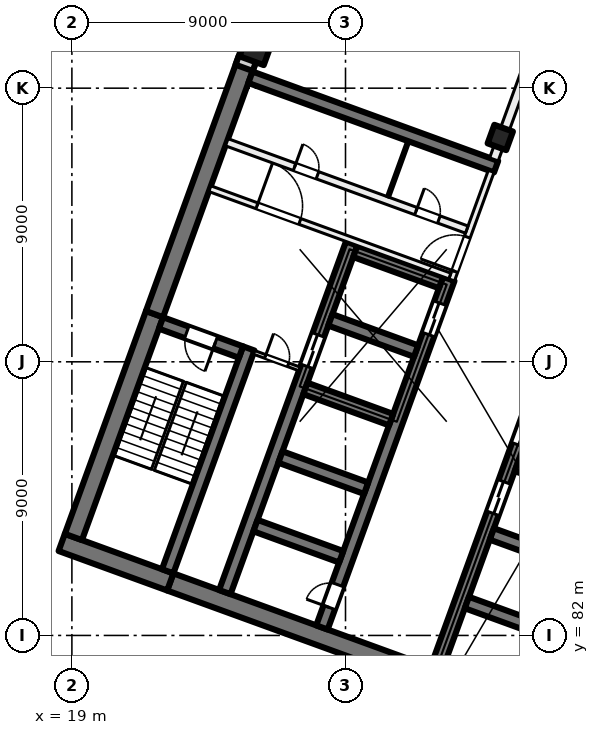
"""IFC4 building model, lengths in metres.
Left out: names, types, materials, properties, quantities, classifications, styles, units other than length and angle.
Written with IfcOpenShell. Run it as: python <this file> out.ifc"""

import sys

from ifc_helpers import new_model, si_unit, direction, frame, frame_2d, origin, origin_2d, place, context, subcontext, project, spatial, rectangle, extrude, element, fill, save


model = new_model("IFC4")
c1 = context("Model", 3, precision=1e-05, world=origin(), true_north=direction((0.0, 1.0)))
c2 = subcontext(c1, "Body", "Model", "MODEL_VIEW")
j1 = project(units=[si_unit("LENGTHUNIT", "METRE"), si_unit("PLANEANGLEUNIT", "RADIAN")], contexts=[c1])
p1 = place(None, origin())
s1 = spatial("IfcSite", under=j1, at=p1, CompositionType="ELEMENT")
p2 = place(p1, origin())
s2 = spatial("IfcBuilding", under=s1, at=p2, CompositionType="ELEMENT")
p3 = place(p2, frame((0.0, 0.0, 89.0)))
s3 = spatial("IfcBuildingStorey", under=s2, at=p3, CompositionType="ELEMENT", Elevation=89.0)
p4 = place(p3, frame((33.091, 98.379, 0.0), z_axis=(0.0, 0.0, 1.0), x_axis=(-0.342020143326, -0.939692620786, 0.0)))
e1 = element("IfcColumn", 1, at=p4, inside=s3, PredefinedType="COLUMN", context=c2, shape_type="SweptSolid", body=[
    extrude(rectangle(XDim=0.65, YDim=0.65, at=origin_2d()), origin(), (0.0, 0.0, 1.0), 4.0),
])
p5 = place(p3, frame((25.056, 101.303, 0.0), z_axis=(0.0, 0.0, 1.0), x_axis=(-0.342020143326, -0.939692620786, 0.0)))
e2 = element("IfcColumn", 2, at=p5, inside=s3, PredefinedType="COLUMN", context=c2, shape_type="SweptSolid", body=[
    extrude(rectangle(XDim=0.85, YDim=0.85, at=origin_2d()), origin(), (0.0, 0.0, 1.0), 4.0),
])
p6 = place(p3, frame((35.767, 78.835, 0.0), z_axis=(0.0, 0.0, 1.0), x_axis=(-0.939692894512, 0.342019391267, 0.0)))
e3 = element("IfcWall", 3, at=p6, inside=s3, PredefinedType="SHEAR", context=c2, shape_type="SweptSolid", body=[
    extrude(rectangle(XDim=14.4, YDim=0.6, at=frame_2d((7.2, 0.0))), origin(), (0.0, 0.0, 1.0), 4.0),
])
p7 = place(p3, frame((22.236, 83.76, 0.0), z_axis=(0.0, 0.0, 1.0), x_axis=(-0.939680822529, 0.342052557032, 0.0)))
e4 = element("IfcWall", 4, at=p7, inside=s3, PredefinedType="SHEAR", context=c2, shape_type="SweptSolid", body=[
    extrude(rectangle(XDim=3.8, YDim=0.6, at=frame_2d((1.9, 0.0))), origin(), (0.0, 0.0, 1.0), 4.0),
])
p8 = place(p3, frame((19.05, 85.239, 0.0), z_axis=(0.0, 0.0, 1.0), x_axis=(0.342016982193, 0.939693771338, 0.0)))
e5 = element("IfcWall", 5, at=p8, inside=s3, PredefinedType="SHEAR", context=c2, shape_type="SweptSolid", body=[
    extrude(rectangle(XDim=7.8, YDim=0.6, at=frame_2d((3.9, 0.0))), origin(), (0.0, 0.0, 1.0), 4.0),
])
p9 = place(p3, frame((21.717, 92.568, 0.0), z_axis=(0.0, 0.0, 1.0), x_axis=(0.342017595281, 0.939693548195, 0.0)))
e6 = element("IfcWall", 6, at=p9, inside=s3, PredefinedType="SHEAR", context=c2, shape_type="SweptSolid", body=[
    extrude(rectangle(XDim=8.925, YDim=0.6, at=frame_2d((4.462, 0.0))), origin(), (0.0, 0.0, 1.0), 4.0),
])
p10 = place(p3, frame((22.15, 84.11, 0.0), z_axis=(0.0, 0.0, 1.0), x_axis=(0.342016982193, 0.939693771338, 0.0)))
e7 = element("IfcWall", 7, at=p10, inside=s3, PredefinedType="SHEAR", context=c2, shape_type="SweptSolid", body=[
    extrude(rectangle(XDim=7.8, YDim=0.4, at=frame_2d((3.9, 0.0))), origin(), (0.0, 0.0, 1.0), 4.0),
])
p11 = place(p3, frame((24.562, 91.32, 0.0), z_axis=(0.0, 0.0, 1.0), x_axis=(-0.939717030584, 0.341953070509, 0.0)))
e8 = element("IfcWall", 8, at=p11, inside=s3, PredefinedType="SHEAR", context=c2, shape_type="SweptSolid", body=[
    extrude(rectangle(XDim=2.8, YDim=0.4, at=frame_2d((1.4, 0.0))), origin(), (0.0, 0.0, 1.0), 4.0),
])
p12 = place(p11, frame((0.9, 0.0, 0.0)))
e9 = element("IfcOpeningElement", 9, at=p12, cuts=e8, PredefinedType="OPENING", context=c2, shape_type="SweptSolid", body=[
    extrude(rectangle(XDim=1.0, YDim=2.1, at=frame_2d((0.5, 1.05))), frame((0.0, 0.21, 0.0), z_axis=(0.0, -1.0, 0.0), x_axis=(1.0, 0.0, 0.0)), (0.0, 0.0, 1.0), 0.42),
])
p13 = place(p3, frame((30.984, 80.895, 0.0), z_axis=(0.0, 0.0, 1.0), x_axis=(0.342021021735, 0.939692301071, 0.0)))
e10 = element("IfcWall", 10, at=p13, inside=s3, PredefinedType="SHEAR", context=c2, shape_type="SweptSolid", body=[
    extrude(rectangle(XDim=12.2, YDim=0.4, at=frame_2d((6.1, 0.0))), origin(), (0.0, 0.0, 1.0), 4.0),
])
p14 = place(p13, frame((5.45, 0.0, 0.0)))
e11 = element("IfcOpeningElement", 11, at=p14, cuts=e10, PredefinedType="OPENING", context=c2, shape_type="SweptSolid", body=[
    extrude(rectangle(XDim=1.1, YDim=2.1, at=frame_2d((0.55, 1.05))), frame((0.0, 0.21, 0.0), z_axis=(0.0, -1.0, 0.0), x_axis=(1.0, 0.0, 0.0)), (0.0, 0.0, 1.0), 0.42),
])
p15 = place(p13, frame((7.85, 0.0, 0.0)))
e12 = element("IfcOpeningElement", 12, at=p15, cuts=e10, PredefinedType="OPENING", context=c2, shape_type="SweptSolid", body=[
    extrude(rectangle(XDim=1.1, YDim=2.1, at=frame_2d((0.55, 1.05))), frame((0.0, 0.21, 0.0), z_axis=(0.0, -1.0, 0.0), x_axis=(1.0, 0.0, 0.0)), (0.0, 0.0, 1.0), 0.42),
])
p16 = place(p13, frame((10.25, 0.0, 0.0)))
e13 = element("IfcOpeningElement", 13, at=p16, cuts=e10, PredefinedType="OPENING", context=c2, shape_type="SweptSolid", body=[
    extrude(rectangle(XDim=1.1, YDim=2.1, at=frame_2d((0.55, 1.05))), frame((0.0, 0.21, 0.0), z_axis=(0.0, -1.0, 0.0), x_axis=(1.0, 0.0, 0.0)), (0.0, 0.0, 1.0), 0.42),
])
for number, where, z_axis, x_axis in (
    (14, (34.812, 82.056, 0.0), (0.0, 0.0, 1.0), (-0.94, 0.342, 0.0)),
    (15, (35.632, 84.311, 0.0), (0.0, 0.0, 1.0), (-0.94, 0.342, 0.0)),
    (16, (36.453, 86.566, 0.0), (0.0, 0.0, 1.0), (-0.94, 0.342, 0.0)),
):
    element("IfcWall", number, at=place(p3, frame(where, z_axis=z_axis, x_axis=x_axis)), inside=s3, PredefinedType="SHEAR", context=c2, shape_type="SweptSolid", body=[
        extrude(rectangle(XDim=3.0, YDim=0.4, at=frame_2d((1.5, 0.0))), origin(), (0.0, 0.0, 1.0), 4.0),
    ])
p17 = place(p3, frame((27.225, 82.263, 0.0), z_axis=(0.0, 0.0, 1.0), x_axis=(0.342014590177, 0.939694641948, 0.0)))
e17 = element("IfcWall", 17, at=p17, inside=s3, PredefinedType="SHEAR", context=c2, shape_type="SweptSolid", body=[
    extrude(rectangle(XDim=12.2, YDim=0.4, at=frame_2d((6.1, 0.0))), origin(), (0.0, 0.0, 1.0), 4.0),
])
p18 = place(p17, frame((10.25, 0.0, 0.0)))
e18 = element("IfcOpeningElement", 18, at=p18, cuts=e17, PredefinedType="OPENING", context=c2, shape_type="SweptSolid", body=[
    extrude(rectangle(XDim=1.1, YDim=2.1, at=frame_2d((0.55, 1.05))), frame((0.0, 0.21, 0.0), z_axis=(0.0, -1.0, 0.0), x_axis=(1.0, 0.0, 0.0)), (0.0, 0.0, 1.0), 0.42),
])
p19 = place(p17, frame((0.7, 0.0, 0.0)))
e19 = element("IfcOpeningElement", 19, at=p19, cuts=e17, PredefinedType="OPENING", context=c2, shape_type="SweptSolid", body=[
    extrude(rectangle(XDim=0.8, YDim=2.1, at=frame_2d((0.4, 1.05))), frame((0.0, 0.21, 0.0), z_axis=(0.0, -1.0, 0.0), x_axis=(1.0, 0.0, 0.0)), (0.0, 0.0, 1.0), 0.42),
])
p20 = place(p3, frame((24.03, 83.426, 0.0), z_axis=(0.0, 0.0, 1.0), x_axis=(0.342014590177, 0.939694641948, 0.0)))
e20 = element("IfcWall", 20, at=p20, inside=s3, PredefinedType="SHEAR", context=c2, shape_type="SweptSolid", body=[
    extrude(rectangle(XDim=12.2, YDim=0.4, at=frame_2d((6.1, 0.0))), origin(), (0.0, 0.0, 1.0), 4.0),
])
p21 = place(p20, frame((7.9, 0.0, 0.0)))
e21 = element("IfcOpeningElement", 21, at=p21, cuts=e20, PredefinedType="OPENING", context=c2, shape_type="SweptSolid", body=[
    extrude(rectangle(XDim=1.1, YDim=2.1, at=frame_2d((0.55, 1.05))), frame((0.0, 0.21, 0.0), z_axis=(0.0, -1.0, 0.0), x_axis=(1.0, 0.0, 0.0)), (0.0, 0.0, 1.0), 0.42),
])
p22 = place(p3, frame((27.858, 84.587, 0.0), z_axis=(0.0, 0.0, 1.0), x_axis=(-0.939686455819, 0.342037080957, 0.0)))
e22 = element("IfcWall", 22, at=p22, inside=s3, PredefinedType="SHEAR", context=c2, shape_type="SweptSolid", body=[
    extrude(rectangle(XDim=3.0, YDim=0.4, at=frame_2d((1.5, 0.0))), origin(), (0.0, 0.0, 1.0), 4.0),
])
p23 = place(p3, frame((28.678, 86.842, 0.0), z_axis=(0.0, 0.0, 1.0), x_axis=(-0.939676934218, 0.342063238742, 0.0)))
e23 = element("IfcWall", 23, at=p23, inside=s3, PredefinedType="SHEAR", context=c2, shape_type="SweptSolid", body=[
    extrude(rectangle(XDim=3.0, YDim=0.4, at=frame_2d((1.5, 0.0))), origin(), (0.0, 0.0, 1.0), 4.0),
])
for number, where, z_axis, x_axis in (
    (24, (29.5, 89.097, 0.0), (0.0, 0.0, 1.0), (-0.94, 0.342, 0.0)),
    (25, (30.32, 91.353, 0.0), (0.0, 0.0, 1.0), (-0.94, 0.342, 0.0)),
    (26, (31.141, 93.608, 0.0), (0.0, 0.0, 1.0), (-0.94, 0.342, 0.0)),
):
    element("IfcWall", number, at=place(p3, frame(where, z_axis=z_axis, x_axis=x_axis)), inside=s3, PredefinedType="SHEAR", context=c2, shape_type="SweptSolid", body=[
        extrude(rectangle(XDim=3.0, YDim=0.4, at=frame_2d((1.5, 0.0))), origin(), (0.0, 0.0, 1.0), 4.0),
    ])
p24 = place(p3, frame((32.953, 97.418, 0.0), z_axis=(0.0, 0.0, 1.0), x_axis=(-0.93969060187, 0.342025690201, 0.0)))
e27 = element("IfcWall", 27, at=p24, inside=s3, PredefinedType="SHEAR", context=c2, shape_type="SweptSolid", body=[
    extrude(rectangle(XDim=8.6, YDim=0.4, at=frame_2d((4.3, 0.0))), origin(), (0.0, 0.0, 1.0), 4.0),
])
p25 = place(p3, frame((24.666, 100.669, 0.0), z_axis=(0.0, 0.0, 1.0), x_axis=(0.34201964167, 0.939692803373, 0.0)))
e28 = element("IfcWall", 28, at=p25, inside=s3, PredefinedType="SOLIDWALL", context=c2, shape_type="SweptSolid", body=[
    extrude(rectangle(XDim=32.884, YDim=0.6, at=frame_2d((16.442, 0.0))), origin(), (0.0, 0.0, 1.0), 3.625),
])
p26 = place(p25, frame((1.48, 0.0, 0.9)))
e29 = element("IfcOpeningElement", 29, at=p26, cuts=e28, PredefinedType="OPENING", context=c2, shape_type="SweptSolid", body=[
    extrude(rectangle(XDim=3.0, YDim=2.4, at=frame_2d((1.5, 1.2))), frame((0.0, 0.31, 0.0), z_axis=(0.0, -1.0, 0.0), x_axis=(1.0, 0.0, 0.0)), (0.0, 0.0, 1.0), 0.62),
])
p27 = place(p25, frame((5.98, 0.0, 0.9)))
e30 = element("IfcOpeningElement", 30, at=p27, cuts=e28, PredefinedType="OPENING", context=c2, shape_type="SweptSolid", body=[
    extrude(rectangle(XDim=3.0, YDim=2.4, at=frame_2d((1.5, 1.2))), frame((0.0, 0.31, 0.0), z_axis=(0.0, -1.0, 0.0), x_axis=(1.0, 0.0, 0.0)), (0.0, 0.0, 1.0), 0.62),
])
p28 = place(p25, frame((10.48, 0.0, 0.9)))
e31 = element("IfcOpeningElement", 31, at=p28, cuts=e28, PredefinedType="OPENING", context=c2, shape_type="SweptSolid", body=[
    extrude(rectangle(XDim=3.0, YDim=2.4, at=frame_2d((1.5, 1.2))), frame((0.0, 0.31, 0.0), z_axis=(0.0, -1.0, 0.0), x_axis=(1.0, 0.0, 0.0)), (0.0, 0.0, 1.0), 0.62),
])
p29 = place(p25, frame((14.98, 0.0, 0.9)))
e32 = element("IfcOpeningElement", 32, at=p29, cuts=e28, PredefinedType="OPENING", context=c2, shape_type="SweptSolid", body=[
    extrude(rectangle(XDim=3.0, YDim=2.4, at=frame_2d((1.5, 1.2))), frame((0.0, 0.31, 0.0), z_axis=(0.0, -1.0, 0.0), x_axis=(1.0, 0.0, 0.0)), (0.0, 0.0, 1.0), 0.62),
])
p30 = place(p25, frame((19.48, 0.0, 0.9)))
e33 = element("IfcOpeningElement", 33, at=p30, cuts=e28, PredefinedType="OPENING", context=c2, shape_type="SweptSolid", body=[
    extrude(rectangle(XDim=3.0, YDim=2.4, at=frame_2d((1.5, 1.2))), frame((0.0, 0.31, 0.0), z_axis=(0.0, -1.0, 0.0), x_axis=(1.0, 0.0, 0.0)), (0.0, 0.0, 1.0), 0.62),
])
p31 = place(p25, frame((23.98, 0.0, 0.9)))
e34 = element("IfcOpeningElement", 34, at=p31, cuts=e28, PredefinedType="OPENING", context=c2, shape_type="SweptSolid", body=[
    extrude(rectangle(XDim=3.0, YDim=2.4, at=frame_2d((1.5, 1.2))), frame((0.0, 0.31, 0.0), z_axis=(0.0, -1.0, 0.0), x_axis=(1.0, 0.0, 0.0)), (0.0, 0.0, 1.0), 0.62),
])
p32 = place(p25, frame((28.48, 0.0, 0.9)))
e35 = element("IfcOpeningElement", 35, at=p32, cuts=e28, PredefinedType="OPENING", context=c2, shape_type="SweptSolid", body=[
    extrude(rectangle(XDim=3.0, YDim=2.4, at=frame_2d((1.5, 1.2))), frame((0.0, 0.31, 0.0), z_axis=(0.0, -1.0, 0.0), x_axis=(1.0, 0.0, 0.0)), (0.0, 0.0, 1.0), 0.62),
])
p33 = place(p3, frame((31.491, 93.693, 0.0), z_axis=(0.0, 0.0, 1.0), x_axis=(0.341995824804, 0.939701471648, 0.0)))
e36 = element("IfcWall", 36, at=p33, inside=s3, PredefinedType="PARTITIONING", context=c2, shape_type="SweptSolid", body=[
    extrude(rectangle(XDim=3.8, YDim=0.2, at=frame_2d((1.9, 0.0))), origin(), (0.0, 0.0, 1.0), 3.625),
])
p34 = place(p33, frame((0.3, 0.0, 0.0)))
e37 = element("IfcOpeningElement", 37, at=p34, cuts=e36, PredefinedType="OPENING", context=c2, shape_type="SweptSolid", body=[
    extrude(rectangle(XDim=1.2, YDim=2.1, at=frame_2d((0.6, 1.05))), frame((0.0, 0.11, 0.0), z_axis=(0.0, -1.0, 0.0), x_axis=(1.0, 0.0, 0.0)), (0.0, 0.0, 1.0), 0.22),
])
p35 = place(p3, frame((23.538, 96.694, 0.0), z_axis=(0.0, 0.0, 1.0), x_axis=(0.939691552312, -0.342023078919, 0.0)))
e38 = element("IfcWall", 38, at=p35, inside=s3, PredefinedType="PARTITIONING", context=c2, shape_type="SweptSolid", body=[
    extrude(rectangle(XDim=8.4, YDim=0.2, at=frame_2d((4.2, 0.0))), origin(), (0.0, 0.0, 1.0), 3.625),
])
p36 = place(p35, frame((1.65, 0.0, 0.0)))
e39 = element("IfcOpeningElement", 39, at=p36, cuts=e38, PredefinedType="OPENING", context=c2, shape_type="SweptSolid", body=[
    extrude(rectangle(XDim=1.5, YDim=2.1, at=frame_2d((0.75, 1.05))), frame((0.0, 0.11, 0.0), z_axis=(0.0, -1.0, 0.0), x_axis=(1.0, 0.0, 0.0)), (0.0, 0.0, 1.0), 0.22),
])
p37 = place(p3, frame((24.094, 98.221, 0.0), z_axis=(0.0, 0.0, 1.0), x_axis=(0.939691552312, -0.342023078919, 0.0)))
e40 = element("IfcWall", 40, at=p37, inside=s3, PredefinedType="PARTITIONING", context=c2, shape_type="SweptSolid", body=[
    extrude(rectangle(XDim=8.4, YDim=0.25, at=frame_2d((4.2, 0.0))), origin(), (0.0, 0.0, 1.0), 3.625),
])
p38 = place(p37, frame((6.625, 0.0, 0.0)))
e41 = element("IfcOpeningElement", 41, at=p38, cuts=e40, PredefinedType="OPENING", context=c2, shape_type="SweptSolid", body=[
    extrude(rectangle(XDim=0.8, YDim=2.1, at=frame_2d((0.4, 1.05))), frame((0.0, 0.135, 0.0), z_axis=(0.0, -1.0, 0.0), x_axis=(1.0, 0.0, 0.0)), (0.0, 0.0, 1.0), 0.27),
])
p39 = place(p37, frame((2.375, 0.0, 0.0)))
e42 = element("IfcOpeningElement", 42, at=p39, cuts=e40, PredefinedType="OPENING", context=c2, shape_type="SweptSolid", body=[
    extrude(rectangle(XDim=0.8, YDim=2.1, at=frame_2d((0.4, 1.05))), frame((0.0, 0.135, 0.0), z_axis=(0.0, -1.0, 0.0), x_axis=(1.0, 0.0, 0.0)), (0.0, 0.0, 1.0), 0.27),
])
p40 = place(p3, frame((24.985, 91.312, 0.0), z_axis=(0.0, 0.0, 1.0), x_axis=(0.939708740826, -0.341975850632, 0.0)))
e43 = element("IfcWall", 43, at=p40, inside=s3, PredefinedType="PARTITIONING", context=c2, shape_type="SweptSolid", body=[
    extrude(rectangle(XDim=1.6, YDim=0.125, at=frame_2d((0.8, 0.0))), origin(), (0.0, 0.0, 1.0), 3.625),
])
p41 = place(p40, frame((0.4, 0.0, 0.0)))
e44 = element("IfcOpeningElement", 44, at=p41, cuts=e43, PredefinedType="OPENING", context=c2, shape_type="SweptSolid", body=[
    extrude(rectangle(XDim=0.8, YDim=2.1, at=frame_2d((0.4, 1.05))), frame((0.0, 0.073, 0.0), z_axis=(0.0, -1.0, 0.0), x_axis=(1.0, 0.0, 0.0)), (0.0, 0.0, 1.0), 0.145),
])
p42 = place(p3, frame((29.399, 96.424, 0.0), z_axis=(0.0, 0.0, 1.0), x_axis=(0.341913947243, 0.939731266204, 0.0)))
e45 = element("IfcWall", 45, at=p42, inside=s3, PredefinedType="PARTITIONING", context=c2, shape_type="SweptSolid", body=[
    extrude(rectangle(XDim=1.95, YDim=0.1, at=frame_2d((0.975, 0.0))), origin(), (0.0, 0.0, 1.0), 3.625),
])
p43 = place(p3, frame((32.881, 97.657, 0.0), z_axis=(0.0, 0.0, 1.0), x_axis=(0.342017360004, 0.939693633828, 0.0)))
e46 = element("IfcWall", 46, at=p43, inside=s3, PredefinedType="PARTITIONING", context=c2, shape_type="SweptSolid", body=[
    extrude(rectangle(XDim=34.516, YDim=0.3, at=frame_2d((17.258, 0.0))), origin(), (0.0, 0.0, 1.0), 3.625),
])
p44 = place(p43, frame((4.275, 0.0, 0.0)))
e47 = element("IfcOpeningElement", 47, at=p44, cuts=e46, PredefinedType="OPENING", context=c2, shape_type="SweptSolid", body=[
    extrude(rectangle(XDim=1.2, YDim=2.1, at=frame_2d((0.6, 1.05))), frame((0.0, 0.16, 0.0), z_axis=(0.0, -1.0, 0.0), x_axis=(1.0, 0.0, 0.0)), (0.0, 0.0, 1.0), 0.32),
])
p45 = place(p43, frame((10.75, 0.0, 0.0)))
e48 = element("IfcOpeningElement", 48, at=p45, cuts=e46, PredefinedType="OPENING", context=c2, shape_type="SweptSolid", body=[
    extrude(rectangle(XDim=1.0, YDim=2.1, at=frame_2d((0.5, 1.05))), frame((0.0, 0.16, 0.0), z_axis=(0.0, -1.0, 0.0), x_axis=(1.0, 0.0, 0.0)), (0.0, 0.0, 1.0), 0.32),
])
p46 = place(p43, frame((15.25, 0.0, 0.0)))
e49 = element("IfcOpeningElement", 49, at=p46, cuts=e46, PredefinedType="OPENING", context=c2, shape_type="SweptSolid", body=[
    extrude(rectangle(XDim=1.0, YDim=2.1, at=frame_2d((0.5, 1.05))), frame((0.0, 0.16, 0.0), z_axis=(0.0, -1.0, 0.0), x_axis=(1.0, 0.0, 0.0)), (0.0, 0.0, 1.0), 0.32),
])
p47 = place(p43, frame((20.4, 0.0, 0.0)))
e50 = element("IfcOpeningElement", 50, at=p47, cuts=e46, PredefinedType="OPENING", context=c2, shape_type="SweptSolid", body=[
    extrude(rectangle(XDim=1.2, YDim=2.1, at=frame_2d((0.6, 1.05))), frame((0.0, 0.16, 0.0), z_axis=(0.0, -1.0, 0.0), x_axis=(1.0, 0.0, 0.0)), (0.0, 0.0, 1.0), 0.32),
])
p48 = place(p43, frame((25.0, 0.0, 0.0)))
e51 = element("IfcOpeningElement", 51, at=p48, cuts=e46, PredefinedType="OPENING", context=c2, shape_type="SweptSolid", body=[
    extrude(rectangle(XDim=1.0, YDim=2.1, at=frame_2d((0.5, 1.05))), frame((0.0, 0.16, 0.0), z_axis=(0.0, -1.0, 0.0), x_axis=(1.0, 0.0, 0.0)), (0.0, 0.0, 1.0), 0.32),
])
p49 = place(p18, origin())
e52 = element("IfcDoor", 52, at=p49, inside=s3, OperationType="DOUBLE_DOOR_SLIDING", PredefinedType="DOOR", context=c2, shape_type="SweptSolid", body=[
    extrude(rectangle(XDim=1.1, YDim=2.1, at=frame_2d((0.55, 1.05))), frame((0.0, 0.025, 0.0), z_axis=(0.0, -1.0, 0.0), x_axis=(1.0, 0.0, 0.0)), (0.0, 0.0, 1.0), 0.05),
])
fill(e18, e52)
p50 = place(p14, origin())
e53 = element("IfcDoor", 53, at=p50, inside=s3, OperationType="DOUBLE_DOOR_SLIDING", PredefinedType="DOOR", context=c2, shape_type="SweptSolid", body=[
    extrude(rectangle(XDim=1.1, YDim=2.1, at=frame_2d((0.55, 1.05))), frame((0.0, 0.025, 0.0), z_axis=(0.0, -1.0, 0.0), x_axis=(1.0, 0.0, 0.0)), (0.0, 0.0, 1.0), 0.05),
])
fill(e11, e53)
p51 = place(p15, origin())
e54 = element("IfcDoor", 54, at=p51, inside=s3, OperationType="DOUBLE_DOOR_SLIDING", PredefinedType="DOOR", context=c2, shape_type="SweptSolid", body=[
    extrude(rectangle(XDim=1.1, YDim=2.1, at=frame_2d((0.55, 1.05))), frame((0.0, 0.025, 0.0), z_axis=(0.0, -1.0, 0.0), x_axis=(1.0, 0.0, 0.0)), (0.0, 0.0, 1.0), 0.05),
])
fill(e12, e54)
p52 = place(p19, origin())
e55 = element("IfcDoor", 55, at=p52, inside=s3, OperationType="SINGLE_SWING_LEFT", PredefinedType="DOOR", context=c2, shape_type="SweptSolid", body=[
    extrude(rectangle(XDim=0.8, YDim=2.1, at=frame_2d((0.4, 1.05))), frame((0.0, 0.025, 0.0), z_axis=(0.0, -1.0, 0.0), x_axis=(1.0, 0.0, 0.0)), (0.0, 0.0, 1.0), 0.05),
])
fill(e19, e55)
p53 = place(p34, origin())
e56 = element("IfcDoor", 56, at=p53, inside=s3, OperationType="DOUBLE_DOOR_SINGLE_SWING", PredefinedType="DOOR", context=c2, shape_type="SweptSolid", body=[
    extrude(rectangle(XDim=1.2, YDim=2.1, at=frame_2d((0.6, 1.05))), frame((0.0, 0.025, 0.0), z_axis=(0.0, -1.0, 0.0), x_axis=(1.0, 0.0, 0.0)), (0.0, 0.0, 1.0), 0.05),
])
fill(e37, e56)
p54 = place(p36, origin())
e57 = element("IfcDoor", 57, at=p54, inside=s3, OperationType="DOUBLE_DOOR_SINGLE_SWING", PredefinedType="DOOR", context=c2, shape_type="SweptSolid", body=[
    extrude(rectangle(XDim=1.5, YDim=2.1, at=frame_2d((0.75, 1.05))), frame((0.0, 0.025, 0.0), z_axis=(0.0, -1.0, 0.0), x_axis=(1.0, 0.0, 0.0)), (0.0, 0.0, 1.0), 0.05),
])
fill(e39, e57)
p55 = place(p12, origin())
e58 = element("IfcDoor", 58, at=p55, inside=s3, OperationType="SINGLE_SWING_LEFT", PredefinedType="DOOR", context=c2, shape_type="SweptSolid", body=[
    extrude(rectangle(XDim=1.0, YDim=2.1, at=frame_2d((0.5, 1.05))), frame((0.0, 0.025, 0.0), z_axis=(0.0, -1.0, 0.0), x_axis=(1.0, 0.0, 0.0)), (0.0, 0.0, 1.0), 0.05),
])
fill(e9, e58)
p56 = place(p41, origin())
e59 = element("IfcDoor", 59, at=p56, inside=s3, OperationType="SINGLE_SWING_RIGHT", PredefinedType="DOOR", context=c2, shape_type="SweptSolid", body=[
    extrude(rectangle(XDim=0.8, YDim=2.1, at=frame_2d((0.4, 1.05))), frame((0.0, 0.025, 0.0), z_axis=(0.0, -1.0, 0.0), x_axis=(1.0, 0.0, 0.0)), (0.0, 0.0, 1.0), 0.05),
])
fill(e44, e59)
p57 = place(p38, origin())
e60 = element("IfcDoor", 60, at=p57, inside=s3, OperationType="SINGLE_SWING_LEFT", PredefinedType="DOOR", context=c2, shape_type="SweptSolid", body=[
    extrude(rectangle(XDim=0.8, YDim=2.1, at=frame_2d((0.4, 1.05))), frame((0.0, 0.025, 0.0), z_axis=(0.0, -1.0, 0.0), x_axis=(1.0, 0.0, 0.0)), (0.0, 0.0, 1.0), 0.05),
])
fill(e41, e60)
p58 = place(p39, origin())
e61 = element("IfcDoor", 61, at=p58, inside=s3, OperationType="SINGLE_SWING_RIGHT", PredefinedType="DOOR", context=c2, shape_type="SweptSolid", body=[
    extrude(rectangle(XDim=0.8, YDim=2.1, at=frame_2d((0.4, 1.05))), frame((0.0, 0.025, 0.0), z_axis=(0.0, -1.0, 0.0), x_axis=(1.0, 0.0, 0.0)), (0.0, 0.0, 1.0), 0.05),
])
fill(e42, e61)
p59 = place(p21, origin())
e62 = element("IfcDoor", 62, at=p59, inside=s3, OperationType="DOUBLE_DOOR_SLIDING", PredefinedType="DOOR", context=c2, shape_type="SweptSolid", body=[
    extrude(rectangle(XDim=1.1, YDim=2.1, at=frame_2d((0.55, 1.05))), frame((0.0, 0.025, 0.0), z_axis=(0.0, -1.0, 0.0), x_axis=(1.0, 0.0, 0.0)), (0.0, 0.0, 1.0), 0.05),
])
fill(e21, e62)
save(model, sys.argv[1])
